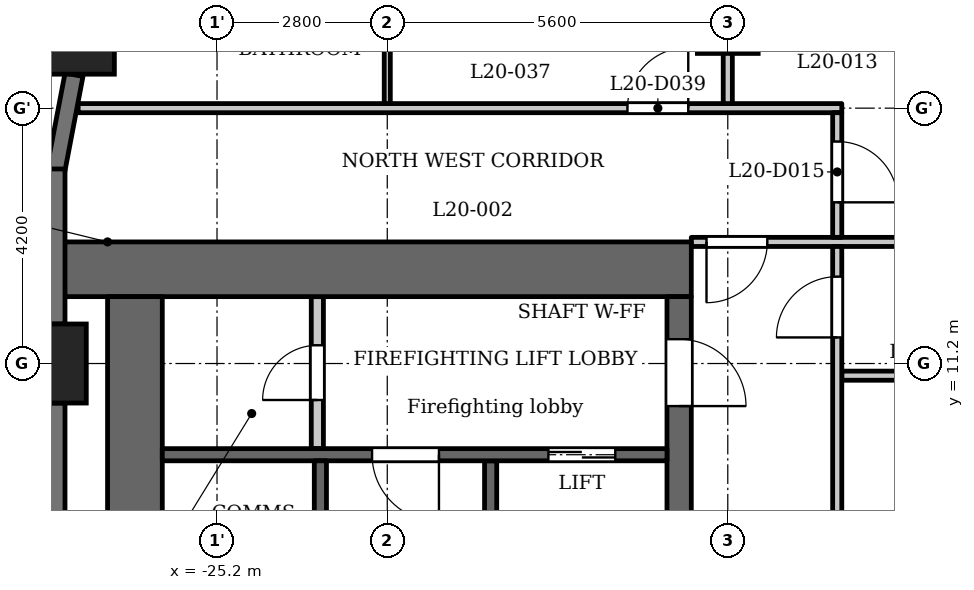
"""IFC4 building model, lengths in metres.
Left out: names, types, materials, properties, quantities, classifications, styles, units other than length and angle.
Written with IfcOpenShell. Run it as: python <this file> out.ifc"""

import sys

from ifc_helpers import new_model, si_unit, direction, frame, frame_2d, origin, origin_2d, place, context, subcontext, project, spatial, rectangle, extrude, element, fill, save


model = new_model("IFC4")
c1 = context("Model", 3, precision=1e-05, world=origin(), true_north=direction((0.0, 1.0)))
c2 = subcontext(c1, "Body", "Model", "MODEL_VIEW")
j1 = project(units=[si_unit("LENGTHUNIT", "METRE"), si_unit("PLANEANGLEUNIT", "RADIAN")], contexts=[c1])
p1 = place(None, origin())
s1 = spatial("IfcSite", under=j1, at=p1, CompositionType="ELEMENT")
p2 = place(p1, origin())
s2 = spatial("IfcBuilding", under=s1, at=p2, CompositionType="ELEMENT")
p3 = place(p2, frame((0.0, 0.0, 83.3)))
s3 = spatial("IfcBuildingStorey", under=s2, at=p3, CompositionType="ELEMENT", Elevation=83.3)
for number, where, z_axis, x_axis in (
    (1, (-27.538, 16.609, 0.0), (0.0, 0.0, 1.0), (1.0, 0.0, 0.0)),
    (2, (-28.0, 11.2, 0.0), (0.0, 0.0, 1.0), (1.0, 0.0, 0.0)),
):
    element("IfcColumn", number, at=place(p3, frame(where, z_axis=z_axis, x_axis=x_axis)), inside=s3, PredefinedType="COLUMN", context=c2, shape_type="SweptSolid", body=[
        extrude(rectangle(XDim=1.3, YDim=1.3, at=origin_2d()), origin(), (0.0, 0.0, 1.0), 3.5),
    ])
p4 = place(p3, frame((-16.8, 16.8, 0.0), z_axis=(0.0, 0.0, 1.0), x_axis=(1.0, 0.0, 0.0)))
e3 = element("IfcColumn", 3, at=p4, inside=s3, PredefinedType="COLUMN", context=c2, shape_type="SweptSolid", body=[
    extrude(rectangle(XDim=1.0, YDim=1.0, at=origin_2d()), origin(), (0.0, 0.0, 1.0), 3.5),
])
p5 = place(p3, frame((-27.552, 15.949, 0.0), z_axis=(0.0, 0.0, 1.0), x_axis=(-0.187279751651, -0.982306619453, 0.0)))
e4 = element("IfcWall", 4, at=p5, inside=s3, PredefinedType="SOLIDWALL", context=c2, shape_type="SweptSolid", body=[
    extrude(rectangle(XDim=1.606, YDim=0.3, at=frame_2d((0.803, 0.0))), origin(), (0.0, 0.0, 1.0), 2.4),
])
p6 = place(p3, frame((-27.85, 14.4, 0.0), z_axis=(0.0, 0.0, 1.0), x_axis=(0.0, -1.0, 0.0)))
e5 = element("IfcWall", 5, at=p6, inside=s3, PredefinedType="SOLIDWALL", context=c2, shape_type="SweptSolid", body=[
    extrude(rectangle(XDim=2.55, YDim=0.3, at=frame_2d((1.275, 0.0))), origin(), (0.0, 0.0, 1.0), 2.4),
])
p7 = place(p3, frame((-27.85, 10.55, 0.0), z_axis=(0.0, 0.0, 1.0), x_axis=(0.0, -1.0, 0.0)))
e6 = element("IfcWall", 6, at=p7, inside=s3, PredefinedType="SOLIDWALL", context=c2, shape_type="SweptSolid", body=[
    extrude(rectangle(XDim=4.3, YDim=0.3, at=frame_2d((2.15, 0.0))), origin(), (0.0, 0.0, 1.0), 2.4),
])
p8 = place(p3, frame((-20.7, 2.6, 0.0), z_axis=(0.0, 0.0, 1.0), x_axis=(0.0, 1.0, 0.0)))
e7 = element("IfcWall", 7, at=p8, inside=s3, PredefinedType="SHEAR", context=c2, shape_type="SweptSolid", body=[
    extrude(rectangle(XDim=7.0, YDim=0.2, at=frame_2d((3.5, 0.0))), origin(), (0.0, 0.0, 1.0), 3.2),
])
p9 = place(p3, frame((-17.4, 12.75, 0.0), z_axis=(0.0, 0.0, 1.0), x_axis=(-1.0, 0.0, 0.0)))
e8 = element("IfcWall", 8, at=p9, inside=s3, PredefinedType="SHEAR", context=c2, shape_type="SweptSolid", body=[
    extrude(rectangle(XDim=10.4, YDim=0.9, at=frame_2d((5.2, 0.0))), origin(), (0.0, 0.0, 1.0), 3.2),
])
p10 = place(p3, frame((-17.6, -12.3, 0.0), z_axis=(0.0, 0.0, 1.0), x_axis=(0.0, 1.0, 0.0)))
e9 = element("IfcWall", 9, at=p10, inside=s3, PredefinedType="SHEAR", context=c2, shape_type="SweptSolid", body=[
    extrude(rectangle(XDim=24.6, YDim=0.4, at=frame_2d((12.3, 0.0))), origin(), (0.0, 0.0, 1.0), 3.2),
])
p11 = place(p10, frame((6.0, 0.0, 0.0)))
e10 = element("IfcOpeningElement", 10, at=p11, cuts=e9, PredefinedType="OPENING", context=c2, shape_type="SweptSolid", body=[
    extrude(rectangle(XDim=1.1, YDim=2.1, at=frame_2d((0.55, 1.05))), frame((0.0, 0.21, 0.0), z_axis=(0.0, -1.0, 0.0), x_axis=(1.0, 0.0, 0.0)), (0.0, 0.0, 1.0), 0.42),
])
p12 = place(p10, frame((8.4, 0.0, 0.0)))
e11 = element("IfcOpeningElement", 11, at=p12, cuts=e9, PredefinedType="OPENING", context=c2, shape_type="SweptSolid", body=[
    extrude(rectangle(XDim=1.1, YDim=2.1, at=frame_2d((0.55, 1.05))), frame((0.0, 0.21, 0.0), z_axis=(0.0, -1.0, 0.0), x_axis=(1.0, 0.0, 0.0)), (0.0, 0.0, 1.0), 0.42),
])
p13 = place(p10, frame((10.8, 0.0, 0.0)))
e12 = element("IfcOpeningElement", 12, at=p13, cuts=e9, PredefinedType="OPENING", context=c2, shape_type="SweptSolid", body=[
    extrude(rectangle(XDim=1.1, YDim=2.1, at=frame_2d((0.55, 1.05))), frame((0.0, 0.21, 0.0), z_axis=(0.0, -1.0, 0.0), x_axis=(1.0, 0.0, 0.0)), (0.0, 0.0, 1.0), 0.42),
])
p14 = place(p10, frame((16.75, 0.0, 0.0)))
e13 = element("IfcOpeningElement", 13, at=p14, cuts=e9, PredefinedType="OPENING", context=c2, shape_type="SweptSolid", body=[
    extrude(rectangle(XDim=0.9, YDim=2.1, at=frame_2d((0.45, 1.05))), frame((0.0, 0.21, 0.0), z_axis=(0.0, -1.0, 0.0), x_axis=(1.0, 0.0, 0.0)), (0.0, 0.0, 1.0), 0.42),
])
p15 = place(p10, frame((22.8, 0.0, 0.0)))
e14 = element("IfcOpeningElement", 14, at=p15, cuts=e9, PredefinedType="OPENING", context=c2, shape_type="SweptSolid", body=[
    extrude(rectangle(XDim=1.1, YDim=2.1, at=frame_2d((0.55, 1.05))), frame((0.0, 0.21, 0.0), z_axis=(0.0, -1.0, 0.0), x_axis=(1.0, 0.0, 0.0)), (0.0, 0.0, 1.0), 0.42),
])
p16 = place(p10, frame((0.7, 0.0, 0.0)))
e15 = element("IfcOpeningElement", 15, at=p16, cuts=e9, PredefinedType="OPENING", context=c2, shape_type="SweptSolid", body=[
    extrude(rectangle(XDim=1.1, YDim=2.1, at=frame_2d((0.55, 1.05))), frame((0.0, 0.21, 0.0), z_axis=(0.0, -1.0, 0.0), x_axis=(1.0, 0.0, 0.0)), (0.0, 0.0, 1.0), 0.42),
])
p17 = place(p10, frame((12.775, 0.0, 0.0)))
e16 = element("IfcOpeningElement", 16, at=p17, cuts=e9, PredefinedType="OPENING", context=c2, shape_type="SweptSolid", body=[
    extrude(rectangle(XDim=1.8, YDim=2.1, at=frame_2d((0.9, 1.05))), frame((0.0, 0.21, 0.0), z_axis=(0.0, -1.0, 0.0), x_axis=(1.0, 0.0, 0.0)), (0.0, 0.0, 1.0), 0.42),
])
p18 = place(p3, frame((-26.55, -12.3, 0.0), z_axis=(0.0, 0.0, 1.0), x_axis=(0.0, 1.0, 0.0)))
e17 = element("IfcWall", 17, at=p18, inside=s3, PredefinedType="SHEAR", context=c2, shape_type="SweptSolid", body=[
    extrude(rectangle(XDim=24.6, YDim=0.9, at=frame_2d((12.3, 0.0))), origin(), (0.0, 0.0, 1.0), 3.2),
])
p19 = place(p3, frame((-23.55, 9.8, 0.0), z_axis=(0.0, 0.0, 1.0), x_axis=(0.0, 1.0, 0.0)))
e18 = element("IfcWall", 18, at=p19, inside=s3, PredefinedType="PARTITIONING", context=c2, shape_type="SweptSolid", body=[
    extrude(rectangle(XDim=2.5, YDim=0.2, at=frame_2d((1.25, 0.0))), origin(), (0.0, 0.0, 1.0), 3.2),
])
p20 = place(p19, frame((0.8, 0.0, 0.0)))
e19 = element("IfcOpeningElement", 19, at=p20, cuts=e18, PredefinedType="OPENING", context=c2, shape_type="SweptSolid", body=[
    extrude(rectangle(XDim=0.9, YDim=2.1, at=frame_2d((0.45, 1.05))), frame((0.0, 0.11, 0.0), z_axis=(0.0, -1.0, 0.0), x_axis=(1.0, 0.0, 0.0)), (0.0, 0.0, 1.0), 0.22),
])
p21 = place(p3, frame((-17.8, 9.7, 0.0), z_axis=(0.0, 0.0, 1.0), x_axis=(-1.0, 0.0, 0.0)))
e20 = element("IfcWall", 20, at=p21, inside=s3, PredefinedType="SHEAR", context=c2, shape_type="SweptSolid", body=[
    extrude(rectangle(XDim=8.3, YDim=0.2, at=frame_2d((4.15, 0.0))), origin(), (0.0, 0.0, 1.0), 3.2),
])
p22 = place(p21, frame((0.85, 0.0, 0.0)))
e21 = element("IfcOpeningElement", 21, at=p22, cuts=e20, PredefinedType="OPENING", context=c2, shape_type="SweptSolid", body=[
    extrude(rectangle(XDim=1.1, YDim=2.1, at=frame_2d((0.55, 1.05))), frame((0.0, 0.11, 0.0), z_axis=(0.0, -1.0, 0.0), x_axis=(1.0, 0.0, 0.0)), (0.0, 0.0, 1.0), 0.22),
])
p23 = place(p21, frame((3.75, 0.0, 0.0)))
e22 = element("IfcOpeningElement", 22, at=p23, cuts=e20, PredefinedType="OPENING", context=c2, shape_type="SweptSolid", body=[
    extrude(rectangle(XDim=1.1, YDim=2.1, at=frame_2d((0.55, 1.05))), frame((0.0, 0.11, 0.0), z_axis=(0.0, -1.0, 0.0), x_axis=(1.0, 0.0, 0.0)), (0.0, 0.0, 1.0), 0.22),
])
p24 = place(p3, frame((-23.5, 2.6, 0.0), z_axis=(0.0, 0.0, 1.0), x_axis=(0.0, 1.0, 0.0)))
e23 = element("IfcWall", 23, at=p24, inside=s3, PredefinedType="SHEAR", context=c2, shape_type="SweptSolid", body=[
    extrude(rectangle(XDim=7.0, YDim=0.2, at=frame_2d((3.5, 0.0))), origin(), (0.0, 0.0, 1.0), 3.2),
])
p25 = place(p3, frame((-14.925, 11.0, 0.0), z_axis=(0.0, 0.0, 1.0), x_axis=(1.0, 0.0, 0.0)))
e24 = element("IfcWall", 24, at=p25, inside=s3, PredefinedType="PARTITIONING", context=c2, shape_type="SweptSolid", body=[
    extrude(rectangle(XDim=29.85, YDim=0.15, at=frame_2d((14.925, 0.0))), origin(), (0.0, 0.0, 1.0), 3.2),
])
p26 = place(p25, frame((1.076, 0.0, 0.0)))
e25 = element("IfcOpeningElement", 25, at=p26, cuts=e24, PredefinedType="OPENING", context=c2, shape_type="SweptSolid", body=[
    extrude(rectangle(XDim=1.0, YDim=2.1, at=frame_2d((0.5, 1.05))), frame((0.0, 0.085, 0.0), z_axis=(0.0, -1.0, 0.0), x_axis=(1.0, 0.0, 0.0)), (0.0, 0.0, 1.0), 0.17),
])
p27 = place(p25, frame((7.625, 0.0, 0.0)))
e26 = element("IfcOpeningElement", 26, at=p27, cuts=e24, PredefinedType="OPENING", context=c2, shape_type="SweptSolid", body=[
    extrude(rectangle(XDim=1.0, YDim=2.1, at=frame_2d((0.5, 1.05))), frame((0.0, 0.085, 0.0), z_axis=(0.0, -1.0, 0.0), x_axis=(1.0, 0.0, 0.0)), (0.0, 0.0, 1.0), 0.17),
])
p28 = place(p25, frame((9.975, 0.0, 0.0)))
e27 = element("IfcOpeningElement", 27, at=p28, cuts=e24, PredefinedType="OPENING", context=c2, shape_type="SweptSolid", body=[
    extrude(rectangle(XDim=1.0, YDim=2.1, at=frame_2d((0.5, 1.05))), frame((0.0, 0.085, 0.0), z_axis=(0.0, -1.0, 0.0), x_axis=(1.0, 0.0, 0.0)), (0.0, 0.0, 1.0), 0.17),
])
p29 = place(p25, frame((18.825, 0.0, 0.0)))
e28 = element("IfcOpeningElement", 28, at=p29, cuts=e24, PredefinedType="OPENING", context=c2, shape_type="SweptSolid", body=[
    extrude(rectangle(XDim=1.0, YDim=2.1, at=frame_2d((0.5, 1.05))), frame((0.0, 0.085, 0.0), z_axis=(0.0, -1.0, 0.0), x_axis=(1.0, 0.0, 0.0)), (0.0, 0.0, 1.0), 0.17),
])
p30 = place(p25, frame((21.175, 0.0, 0.0)))
e29 = element("IfcOpeningElement", 29, at=p30, cuts=e24, PredefinedType="OPENING", context=c2, shape_type="SweptSolid", body=[
    extrude(rectangle(XDim=1.0, YDim=2.1, at=frame_2d((0.5, 1.05))), frame((0.0, 0.085, 0.0), z_axis=(0.0, -1.0, 0.0), x_axis=(1.0, 0.0, 0.0)), (0.0, 0.0, 1.0), 0.17),
])
p31 = place(p25, frame((27.775, 0.0, 0.0)))
e30 = element("IfcOpeningElement", 30, at=p31, cuts=e24, PredefinedType="OPENING", context=c2, shape_type="SweptSolid", body=[
    extrude(rectangle(XDim=1.0, YDim=2.1, at=frame_2d((0.5, 1.05))), frame((0.0, 0.085, 0.0), z_axis=(0.0, -1.0, 0.0), x_axis=(1.0, 0.0, 0.0)), (0.0, 0.0, 1.0), 0.17),
])
p32 = place(p3, frame((-17.4, 13.2, 0.0), z_axis=(0.0, 0.0, 1.0), x_axis=(1.0, 0.0, 0.0)))
e31 = element("IfcWall", 31, at=p32, inside=s3, PredefinedType="PARTITIONING", context=c2, shape_type="SweptSolid", body=[
    extrude(rectangle(XDim=34.8, YDim=0.15, at=frame_2d((17.4, 0.0))), origin(), (0.0, 0.0, 1.0), 3.2),
])
p33 = place(p32, frame((0.25, 0.0, 0.0)))
e32 = element("IfcOpeningElement", 32, at=p33, cuts=e31, PredefinedType="OPENING", context=c2, shape_type="SweptSolid", body=[
    extrude(rectangle(XDim=1.0, YDim=2.1, at=frame_2d((0.5, 1.05))), frame((0.0, 0.085, 0.0), z_axis=(0.0, -1.0, 0.0), x_axis=(1.0, 0.0, 0.0)), (0.0, 0.0, 1.0), 0.17),
])
p34 = place(p32, frame((33.65, 0.0, 0.0)))
e33 = element("IfcOpeningElement", 33, at=p34, cuts=e31, PredefinedType="OPENING", context=c2, shape_type="SweptSolid", body=[
    extrude(rectangle(XDim=1.0, YDim=2.1, at=frame_2d((0.5, 1.05))), frame((0.0, 0.085, 0.0), z_axis=(0.0, -1.0, 0.0), x_axis=(1.0, 0.0, 0.0)), (0.0, 0.0, 1.0), 0.17),
])
p35 = place(p32, frame((15.75, 0.0, 0.0)))
e34 = element("IfcOpeningElement", 34, at=p35, cuts=e31, PredefinedType="OPENING", context=c2, shape_type="SweptSolid", body=[
    extrude(rectangle(XDim=1.0, YDim=2.1, at=frame_2d((0.5, 1.05))), frame((0.0, 0.085, 0.0), z_axis=(0.0, -1.0, 0.0), x_axis=(1.0, 0.0, 0.0)), (0.0, 0.0, 1.0), 0.17),
])
p36 = place(p32, frame((21.35, 0.0, 0.0)))
e35 = element("IfcOpeningElement", 35, at=p36, cuts=e31, PredefinedType="OPENING", context=c2, shape_type="SweptSolid", body=[
    extrude(rectangle(XDim=1.0, YDim=2.1, at=frame_2d((0.5, 1.05))), frame((0.0, 0.085, 0.0), z_axis=(0.0, -1.0, 0.0), x_axis=(1.0, 0.0, 0.0)), (0.0, 0.0, 1.0), 0.17),
])
p37 = place(p3, frame((-27.484, 15.4, 0.0), z_axis=(0.0, 0.0, 1.0), x_axis=(1.0, 0.0, 0.0)))
e36 = element("IfcWall", 36, at=p37, inside=s3, PredefinedType="PARTITIONING", context=c2, shape_type="SweptSolid", body=[
    extrude(rectangle(XDim=12.559, YDim=0.15, at=frame_2d((6.279, 0.0))), origin(), (0.0, 0.0, 1.0), 3.2),
])
p38 = place(p37, frame((9.034, 0.0, 0.0)))
e37 = element("IfcOpeningElement", 37, at=p38, cuts=e36, PredefinedType="OPENING", context=c2, shape_type="SweptSolid", body=[
    extrude(rectangle(XDim=1.0, YDim=2.1, at=frame_2d((0.5, 1.05))), frame((0.0, 0.085, 0.0), z_axis=(0.0, -1.0, 0.0), x_axis=(1.0, 0.0, 0.0)), (0.0, 0.0, 1.0), 0.17),
])
p39 = place(p3, frame((-22.4, 15.475, 0.0), z_axis=(0.0, 0.0, 1.0), x_axis=(0.0, 1.0, 0.0)))
e38 = element("IfcWall", 38, at=p39, inside=s3, PredefinedType="PARTITIONING", context=c2, shape_type="SweptSolid", body=[
    extrude(rectangle(XDim=2.275, YDim=0.1, at=frame_2d((1.137, 0.0))), origin(), (0.0, 0.0, 1.0), 3.2),
])
p40 = place(p3, frame((-16.8, 15.475, 0.0), z_axis=(0.0, 0.0, 1.0), x_axis=(0.0, 1.0, 0.0)))
e39 = element("IfcWall", 39, at=p40, inside=s3, PredefinedType="PARTITIONING", context=c2, shape_type="SweptSolid", body=[
    extrude(rectangle(XDim=7.555, YDim=0.15, at=frame_2d((3.777, 0.0))), origin(), (0.0, 0.0, 1.0), 3.2),
])
p41 = place(p3, frame((-15.0, 6.769, 0.0), z_axis=(0.0, 0.0, 1.0), x_axis=(0.0, 1.0, 0.0)))
e40 = element("IfcWall", 40, at=p41, inside=s3, PredefinedType="PARTITIONING", context=c2, shape_type="SweptSolid", body=[
    extrude(rectangle(XDim=6.356, YDim=0.15, at=frame_2d((3.178, 0.0))), origin(), (0.0, 0.0, 1.0), 3.2),
])
p42 = place(p41, frame((4.86, 0.0, 0.0)))
e41 = element("IfcOpeningElement", 41, at=p42, cuts=e40, PredefinedType="OPENING", context=c2, shape_type="SweptSolid", body=[
    extrude(rectangle(XDim=1.0, YDim=2.1, at=frame_2d((0.5, 1.05))), frame((0.0, 0.085, 0.0), z_axis=(0.0, -1.0, 0.0), x_axis=(1.0, 0.0, 0.0)), (0.0, 0.0, 1.0), 0.17),
])
p43 = place(p3, frame((-15.0, 13.275, 0.0), z_axis=(0.0, 0.0, 1.0), x_axis=(0.0, 1.0, 0.0)))
e42 = element("IfcWall", 42, at=p43, inside=s3, PredefinedType="PARTITIONING", context=c2, shape_type="SweptSolid", body=[
    extrude(rectangle(XDim=2.05, YDim=0.15, at=frame_2d((1.025, 0.0))), origin(), (0.0, 0.0, 1.0), 3.2),
])
p44 = place(p43, frame((0.576, 0.0, 0.0)))
e43 = element("IfcOpeningElement", 43, at=p44, cuts=e42, PredefinedType="OPENING", context=c2, shape_type="SweptSolid", body=[
    extrude(rectangle(XDim=1.0, YDim=2.1, at=frame_2d((0.5, 1.05))), frame((0.0, 0.085, 0.0), z_axis=(0.0, -1.0, 0.0), x_axis=(1.0, 0.0, 0.0)), (0.0, 0.0, 1.0), 0.17),
])
p45 = place(p22, origin())
e44 = element("IfcDoor", 44, at=p45, inside=s3, OperationType="DOUBLE_DOOR_SLIDING", PredefinedType="DOOR", context=c2, shape_type="SweptSolid", body=[
    extrude(rectangle(XDim=1.1, YDim=2.1, at=frame_2d((0.55, 1.05))), frame((0.0, 0.025, 0.0), z_axis=(0.0, -1.0, 0.0), x_axis=(1.0, 0.0, 0.0)), (0.0, 0.0, 1.0), 0.05),
])
fill(e21, e44)
p46 = place(p15, origin())
e45 = element("IfcDoor", 45, at=p46, inside=s3, OperationType="SINGLE_SWING_LEFT", PredefinedType="DOOR", context=c2, shape_type="SweptSolid", body=[
    extrude(rectangle(XDim=1.1, YDim=2.1, at=frame_2d((0.55, 1.05))), frame((0.0, 0.025, 0.0), z_axis=(0.0, -1.0, 0.0), x_axis=(1.0, 0.0, 0.0)), (0.0, 0.0, 1.0), 0.05),
])
fill(e14, e45)
p47 = place(p20, origin())
e46 = element("IfcDoor", 46, at=p47, inside=s3, OperationType="SINGLE_SWING_RIGHT", PredefinedType="DOOR", context=c2, shape_type="SweptSolid", body=[
    extrude(rectangle(XDim=0.9, YDim=2.1, at=frame_2d((0.45, 1.05))), frame((0.0, 0.025, 0.0), z_axis=(0.0, -1.0, 0.0), x_axis=(1.0, 0.0, 0.0)), (0.0, 0.0, 1.0), 0.05),
])
fill(e19, e46)
p48 = place(p23, origin())
e47 = element("IfcDoor", 47, at=p48, inside=s3, OperationType="SINGLE_SWING_RIGHT", PredefinedType="DOOR", context=c2, shape_type="SweptSolid", body=[
    extrude(rectangle(XDim=1.1, YDim=2.1, at=frame_2d((0.55, 1.05))), frame((0.0, 0.025, 0.0), z_axis=(0.0, -1.0, 0.0), x_axis=(1.0, 0.0, 0.0)), (0.0, 0.0, 1.0), 0.05),
])
fill(e22, e47)
p49 = place(p42, origin())
e48 = element("IfcDoor", 48, at=p49, inside=s3, OperationType="SINGLE_SWING_RIGHT", PredefinedType="DOOR", context=c2, shape_type="SweptSolid", body=[
    extrude(rectangle(XDim=1.0, YDim=2.1, at=frame_2d((0.5, 1.05))), frame((0.0, 0.025, 0.0), z_axis=(0.0, -1.0, 0.0), x_axis=(1.0, 0.0, 0.0)), (0.0, 0.0, 1.0), 0.05),
])
fill(e41, e48)
p50 = place(p33, origin())
e49 = element("IfcDoor", 49, at=p50, inside=s3, OperationType="SINGLE_SWING_LEFT", PredefinedType="DOOR", context=c2, shape_type="SweptSolid", body=[
    extrude(rectangle(XDim=1.0, YDim=2.1, at=frame_2d((0.5, 1.05))), frame((0.0, 0.025, 0.0), z_axis=(0.0, -1.0, 0.0), x_axis=(1.0, 0.0, 0.0)), (0.0, 0.0, 1.0), 0.05),
])
fill(e32, e49)
p51 = place(p44, origin())
e50 = element("IfcDoor", 50, at=p51, inside=s3, OperationType="SINGLE_SWING_LEFT", PredefinedType="DOOR", context=c2, shape_type="SweptSolid", body=[
    extrude(rectangle(XDim=1.0, YDim=2.1, at=frame_2d((0.5, 1.05))), frame((0.0, 0.025, 0.0), z_axis=(0.0, -1.0, 0.0), x_axis=(1.0, 0.0, 0.0)), (0.0, 0.0, 1.0), 0.05),
])
fill(e43, e50)
p52 = place(p38, origin())
e51 = element("IfcDoor", 51, at=p52, inside=s3, OperationType="SINGLE_SWING_LEFT", PredefinedType="DOOR", context=c2, shape_type="SweptSolid", body=[
    extrude(rectangle(XDim=1.0, YDim=2.1, at=frame_2d((0.5, 1.05))), frame((0.0, 0.025, 0.0), z_axis=(0.0, -1.0, 0.0), x_axis=(1.0, 0.0, 0.0)), (0.0, 0.0, 1.0), 0.05),
])
fill(e37, e51)
save(model, sys.argv[1])
